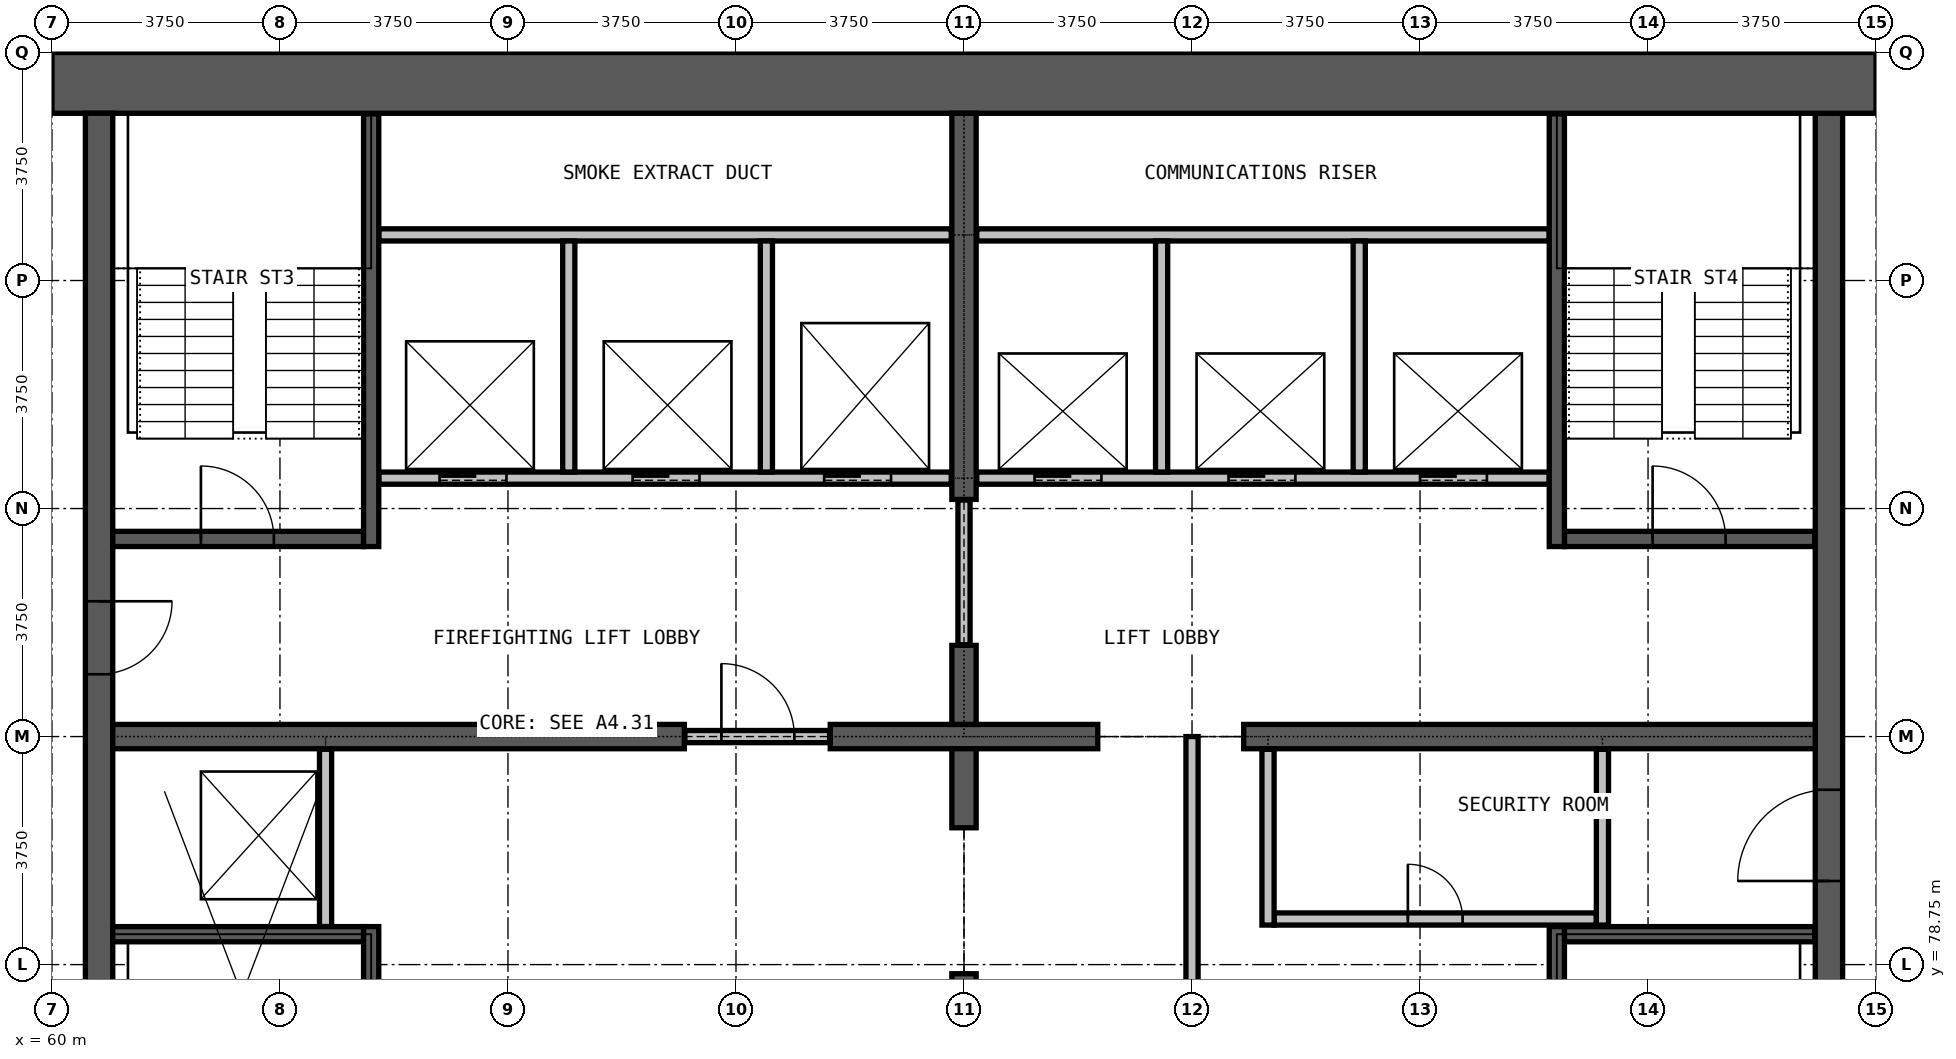
"""IFC4 building model, lengths in metres.
Left out: names, types, materials, properties, quantities, classifications, styles, units other than length and angle.
Written with IfcOpenShell. Run it as: python <this file> out.ifc"""

import sys

from ifc_helpers import new_model, si_unit, direction, frame, frame_2d, origin, place, context, subcontext, project, spatial, rectangle, extrude, element, fill, save


model = new_model("IFC4")
c1 = context("Model", 3, precision=1e-05, world=origin(), true_north=direction((0.0, 1.0)))
c2 = subcontext(c1, "Body", "Model", "MODEL_VIEW")
j1 = project(units=[si_unit("LENGTHUNIT", "METRE"), si_unit("PLANEANGLEUNIT", "RADIAN")], contexts=[c1])
p1 = place(None, origin())
s1 = spatial("IfcSite", under=j1, at=p1, CompositionType="ELEMENT")
p2 = place(p1, origin())
s2 = spatial("IfcBuilding", under=s1, at=p2, CompositionType="ELEMENT")
p3 = place(p2, frame((0.0, 0.0, 280.1)))
s3 = spatial("IfcBuildingStorey", under=s2, at=p3, CompositionType="ELEMENT", Elevation=280.1)
p4 = place(p3, frame((89.225, 72.25, 0.0), z_axis=(0.0, 0.0, 1.0), x_axis=(0.0, 1.0, 0.0)))
e1 = element("IfcWall", 1, at=p4, inside=s3, PredefinedType="SHEAR", context=c2, shape_type="SweptSolid", body=[
    extrude(rectangle(XDim=20.5, YDim=0.45, at=frame_2d((10.25, 0.0))), origin(), (0.0, 0.0, 1.0), 3.6),
])
p5 = place(p4, frame((7.875, 0.0, 0.0)))
e2 = element("IfcOpeningElement", 2, at=p5, cuts=e1, PredefinedType="OPENING", context=c2, shape_type="SweptSolid", body=[
    extrude(rectangle(XDim=1.5, YDim=2.2, at=frame_2d((0.75, 1.1))), frame((0.0, 0.235, 0.0), z_axis=(0.0, -1.0, 0.0), x_axis=(1.0, 0.0, 0.0)), (0.0, 0.0, 1.0), 0.47),
])
p6 = place(p3, frame((90.0, 93.25, 0.0), z_axis=(0.0, 0.0, 1.0), x_axis=(-1.0, 0.0, 0.0)))
e3 = element("IfcWall", 3, at=p6, inside=s3, PredefinedType="SHEAR", context=c2, shape_type="SweptSolid", body=[
    extrude(rectangle(XDim=30.0, YDim=1.0, at=frame_2d((15.0, 0.0))), origin(), (0.0, 0.0, 1.0), 3.6),
])
p7 = place(p3, frame((60.775, 92.75, 0.0), z_axis=(0.0, 0.0, 1.0), x_axis=(0.0, -1.0, 0.0)))
e4 = element("IfcWall", 4, at=p7, inside=s3, PredefinedType="SHEAR", context=c2, shape_type="SweptSolid", body=[
    extrude(rectangle(XDim=20.5, YDim=0.45, at=frame_2d((10.25, 0.0))), origin(), (0.0, 0.0, 1.0), 3.6),
])
p8 = place(p7, frame((8.025, 0.0, 0.0)))
e5 = element("IfcOpeningElement", 5, at=p8, cuts=e4, PredefinedType="OPENING", context=c2, shape_type="SweptSolid", body=[
    extrude(rectangle(XDim=1.2, YDim=2.2, at=frame_2d((0.6, 1.1))), frame((0.0, 0.235, 0.0), z_axis=(0.0, -1.0, 0.0), x_axis=(1.0, 0.0, 0.0)), (0.0, 0.0, 1.0), 0.47),
])
p9 = place(p3, frame((61.0, 82.5, 0.0), z_axis=(0.0, 0.0, 1.0), x_axis=(1.0, 0.0, 0.0)))
e6 = element("IfcWall", 6, at=p9, inside=s3, PredefinedType="SHEAR", context=c2, shape_type="SweptSolid", body=[
    extrude(rectangle(XDim=9.4, YDim=0.4, at=frame_2d((4.7, 0.0))), origin(), (0.0, 0.0, 1.0), 3.6),
])
p10 = place(p3, frame((72.8, 82.5, 0.0), z_axis=(0.0, 0.0, 1.0), x_axis=(1.0, 0.0, 0.0)))
e7 = element("IfcWall", 7, at=p10, inside=s3, PredefinedType="SHEAR", context=c2, shape_type="SweptSolid", body=[
    extrude(rectangle(XDim=4.4, YDim=0.4, at=frame_2d((2.2, 0.0))), origin(), (0.0, 0.0, 1.0), 3.6),
])
p11 = place(p3, frame((79.6, 82.5, 0.0), z_axis=(0.0, 0.0, 1.0), x_axis=(1.0, 0.0, 0.0)))
e8 = element("IfcWall", 8, at=p11, inside=s3, PredefinedType="SHEAR", context=c2, shape_type="SweptSolid", body=[
    extrude(rectangle(XDim=9.4, YDim=0.4, at=frame_2d((4.7, 0.0))), origin(), (0.0, 0.0, 1.0), 3.6),
])
p12 = place(p3, frame((75.0, 72.25, 0.0), z_axis=(0.0, 0.0, 1.0), x_axis=(0.0, 1.0, 0.0)))
e9 = element("IfcWall", 9, at=p12, inside=s3, PredefinedType="SHEAR", context=c2, shape_type="SweptSolid", body=[
    extrude(rectangle(XDim=6.35, YDim=0.4, at=frame_2d((3.175, 0.0))), origin(), (0.0, 0.0, 1.0), 3.6),
])
for number, where, z_axis, x_axis in (
    (10, (75.0, 81.0, 0.0), (0.0, 0.0, 1.0), (0.0, 1.0, 0.0)),
    (11, (75.0, 82.7, 0.0), (0.0, 0.0, 1.0), (0.0, 1.0, 0.0)),
):
    element("IfcWall", number, at=place(p3, frame(where, z_axis=z_axis, x_axis=x_axis)), inside=s3, PredefinedType="SHEAR", context=c2, shape_type="SweptSolid", body=[
        extrude(rectangle(XDim=1.3, YDim=0.4, at=frame_2d((0.65, 0.0))), origin(), (0.0, 0.0, 1.0), 3.6),
    ])
p13 = place(p3, frame((75.0, 86.4, 0.0), z_axis=(0.0, 0.0, 1.0), x_axis=(0.0, 1.0, 0.0)))
e12 = element("IfcWall", 12, at=p13, inside=s3, PredefinedType="SHEAR", context=c2, shape_type="SweptSolid", body=[
    extrude(rectangle(XDim=6.35, YDim=0.4, at=frame_2d((3.175, 0.0))), origin(), (0.0, 0.0, 1.0), 3.6),
])
p14 = place(p3, frame((80.1, 79.5, 0.0), z_axis=(0.0, 0.0, 1.0), x_axis=(1.0, 0.0, 0.0)))
e13 = element("IfcWall", 13, at=p14, inside=s3, PredefinedType="PARTITIONING", context=c2, shape_type="SweptSolid", body=[
    extrude(rectangle(XDim=5.3, YDim=0.2, at=frame_2d((2.65, 0.0))), origin(), (0.0, 0.0, 1.0), 3.3),
])
p15 = place(p14, frame((2.2, 0.0, 0.0)))
e14 = element("IfcOpeningElement", 14, at=p15, cuts=e13, PredefinedType="OPENING", context=c2, shape_type="SweptSolid", body=[
    extrude(rectangle(XDim=0.9, YDim=2.2, at=frame_2d((0.45, 1.1))), frame((0.0, 0.11, 0.0), z_axis=(0.0, -1.0, 0.0), x_axis=(1.0, 0.0, 0.0)), (0.0, 0.0, 1.0), 0.22),
])
p16 = place(p3, frame((70.41, 82.5, 0.0), z_axis=(0.0, 0.0, 1.0), x_axis=(1.0, 0.0, 0.0)))
e15 = element("IfcWall", 15, at=p16, inside=s3, PredefinedType="PARTITIONING", context=c2, shape_type="SweptSolid", body=[
    extrude(rectangle(XDim=2.38, YDim=0.2, at=frame_2d((1.19, 0.0))), origin(), (0.0, 0.0, 1.0), 2.4),
])
p17 = place(p16, frame((0.6, 0.0, 0.0)))
e16 = element("IfcOpeningElement", 16, at=p17, cuts=e15, PredefinedType="OPENING", context=c2, shape_type="SweptSolid", body=[
    extrude(rectangle(XDim=1.2, YDim=2.2, at=frame_2d((0.6, 1.1))), frame((0.0, 0.11, 0.0), z_axis=(0.0, -1.0, 0.0), x_axis=(1.0, 0.0, 0.0)), (0.0, 0.0, 1.0), 0.22),
])
p18 = place(p3, frame((75.0, 84.01, 0.0), z_axis=(0.0, 0.0, 1.0), x_axis=(0.0, 1.0, 0.0)))
e17 = element("IfcWall", 17, at=p18, inside=s3, PredefinedType="PARTITIONING", context=c2, shape_type="SweptSolid", body=[
    extrude(rectangle(XDim=2.38, YDim=0.2, at=frame_2d((1.19, 0.0))), origin(), (0.0, 0.0, 1.0), 2.4),
])
p19 = place(p3, frame((78.75, 72.26, 0.0), z_axis=(0.0, 0.0, 1.0), x_axis=(0.0, 1.0, 0.0)))
e18 = element("IfcWall", 18, at=p19, inside=s3, PredefinedType="PARTITIONING", context=c2, shape_type="SweptSolid", body=[
    extrude(rectangle(XDim=10.24, YDim=0.2, at=frame_2d((5.12, 0.0))), origin(), (0.0, 0.0, 1.0), 3.3),
])
for number, where, z_axis, x_axis in (
    (19, (80.0, 79.4, 0.0), (0.0, 0.0, 1.0), (0.0, 1.0, 0.0)),
    (20, (85.5, 79.4, 0.0), (0.0, 0.0, 1.0), (0.0, 1.0, 0.0)),
):
    element("IfcWall", number, at=place(p3, frame(where, z_axis=z_axis, x_axis=x_axis)), inside=s3, PredefinedType="PARTITIONING", context=c2, shape_type="SweptSolid", body=[
        extrude(rectangle(XDim=2.89, YDim=0.2, at=frame_2d((1.445, 0.0))), origin(), (0.0, 0.0, 1.0), 3.3),
    ])
p20 = place(p3, frame((65.375, 86.75, 0.0), z_axis=(0.0, 0.0, 1.0), x_axis=(1.0, 0.0, 0.0)))
e21 = element("IfcWall", 21, at=p20, inside=s3, PredefinedType="PARTITIONING", context=c2, shape_type="SweptSolid", body=[
    extrude(rectangle(XDim=9.415, YDim=0.2, at=frame_2d((4.708, 0.0))), origin(), (0.0, 0.0, 1.0), 3.3),
])
p21 = place(p20, frame((1.0, 0.0, 0.0)))
e22 = element("IfcOpeningElement", 22, at=p21, cuts=e21, PredefinedType="OPENING", context=c2, shape_type="SweptSolid", body=[
    extrude(rectangle(XDim=1.1, YDim=2.2, at=frame_2d((0.55, 1.1))), frame((0.0, 0.11, 0.0), z_axis=(0.0, -1.0, 0.0), x_axis=(1.0, 0.0, 0.0)), (0.0, 0.0, 1.0), 0.22),
])
p22 = place(p20, frame((4.175, 0.0, 0.0)))
e23 = element("IfcOpeningElement", 23, at=p22, cuts=e21, PredefinedType="OPENING", context=c2, shape_type="SweptSolid", body=[
    extrude(rectangle(XDim=1.1, YDim=2.2, at=frame_2d((0.55, 1.1))), frame((0.0, 0.11, 0.0), z_axis=(0.0, -1.0, 0.0), x_axis=(1.0, 0.0, 0.0)), (0.0, 0.0, 1.0), 0.22),
])
p23 = place(p20, frame((7.325, 0.0, 0.0)))
e24 = element("IfcOpeningElement", 24, at=p23, cuts=e21, PredefinedType="OPENING", context=c2, shape_type="SweptSolid", body=[
    extrude(rectangle(XDim=1.1, YDim=2.2, at=frame_2d((0.55, 1.1))), frame((0.0, 0.11, 0.0), z_axis=(0.0, -1.0, 0.0), x_axis=(1.0, 0.0, 0.0)), (0.0, 0.0, 1.0), 0.22),
])
p24 = place(p3, frame((75.21, 86.75, 0.0), z_axis=(0.0, 0.0, 1.0), x_axis=(1.0, 0.0, 0.0)))
e25 = element("IfcWall", 25, at=p24, inside=s3, PredefinedType="PARTITIONING", context=c2, shape_type="SweptSolid", body=[
    extrude(rectangle(XDim=9.415, YDim=0.2, at=frame_2d((4.708, 0.0))), origin(), (0.0, 0.0, 1.0), 3.3),
])
p25 = place(p24, frame((0.95, 0.0, 0.0)))
e26 = element("IfcOpeningElement", 26, at=p25, cuts=e25, PredefinedType="OPENING", context=c2, shape_type="SweptSolid", body=[
    extrude(rectangle(XDim=1.1, YDim=2.2, at=frame_2d((0.55, 1.1))), frame((0.0, 0.11, 0.0), z_axis=(0.0, -1.0, 0.0), x_axis=(1.0, 0.0, 0.0)), (0.0, 0.0, 1.0), 0.22),
])
p26 = place(p24, frame((4.14, 0.0, 0.0)))
e27 = element("IfcOpeningElement", 27, at=p26, cuts=e25, PredefinedType="OPENING", context=c2, shape_type="SweptSolid", body=[
    extrude(rectangle(XDim=1.1, YDim=2.2, at=frame_2d((0.55, 1.1))), frame((0.0, 0.11, 0.0), z_axis=(0.0, -1.0, 0.0), x_axis=(1.0, 0.0, 0.0)), (0.0, 0.0, 1.0), 0.22),
])
p27 = place(p24, frame((7.29, 0.0, 0.0)))
e28 = element("IfcOpeningElement", 28, at=p27, cuts=e25, PredefinedType="OPENING", context=c2, shape_type="SweptSolid", body=[
    extrude(rectangle(XDim=1.1, YDim=2.2, at=frame_2d((0.55, 1.1))), frame((0.0, 0.11, 0.0), z_axis=(0.0, -1.0, 0.0), x_axis=(1.0, 0.0, 0.0)), (0.0, 0.0, 1.0), 0.22),
])
for number, where, z_axis, x_axis in (
    (29, (65.375, 90.75, 0.0), (0.0, 0.0, 1.0), (1.0, 0.0, 0.0)),
    (30, (75.21, 90.75, 0.0), (0.0, 0.0, 1.0), (1.0, 0.0, 0.0)),
):
    element("IfcWall", number, at=place(p3, frame(where, z_axis=z_axis, x_axis=x_axis)), inside=s3, PredefinedType="PARTITIONING", context=c2, shape_type="SweptSolid", body=[
        extrude(rectangle(XDim=9.415, YDim=0.2, at=frame_2d((4.708, 0.0))), origin(), (0.0, 0.0, 1.0), 3.3),
    ])
p28 = place(p3, frame((64.5, 79.375, 0.0), z_axis=(0.0, 0.0, 1.0), x_axis=(0.0, 1.0, 0.0)))
e31 = element("IfcWall", 31, at=p28, inside=s3, PredefinedType="PARTITIONING", context=c2, shape_type="SweptSolid", body=[
    extrude(rectangle(XDim=2.915, YDim=0.2, at=frame_2d((1.458, 0.0))), origin(), (0.0, 0.0, 1.0), 3.3),
])
for number, where, z_axis, x_axis in (
    (32, (68.5, 86.85, 0.0), (0.0, 0.0, 1.0), (0.0, 1.0, 0.0)),
    (33, (71.75, 86.85, 0.0), (0.0, 0.0, 1.0), (0.0, 1.0, 0.0)),
    (34, (78.25, 86.85, 0.0), (0.0, 0.0, 1.0), (0.0, 1.0, 0.0)),
    (35, (81.5, 86.85, 0.0), (0.0, 0.0, 1.0), (0.0, 1.0, 0.0)),
):
    element("IfcWall", number, at=place(p3, frame(where, z_axis=z_axis, x_axis=x_axis)), inside=s3, PredefinedType="PARTITIONING", context=c2, shape_type="SweptSolid", body=[
        extrude(rectangle(XDim=3.8, YDim=0.2, at=frame_2d((1.9, 0.0))), origin(), (0.0, 0.0, 1.0), 3.3),
    ])
p29 = place(p3, frame((61.0, 79.25, 0.0), z_axis=(0.0, 0.0, 1.0), x_axis=(1.0, 0.0, 0.0)))
e36 = element("IfcWall", 36, at=p29, inside=s3, PredefinedType="PARTITIONING", context=c2, shape_type="SweptSolid", body=[
    extrude(rectangle(XDim=4.125, YDim=0.25, at=frame_2d((2.062, 0.0))), origin(), (0.0, 0.0, 1.0), 3.3),
])
p30 = place(p3, frame((84.875, 79.25, 0.0), z_axis=(0.0, 0.0, 1.0), x_axis=(1.0, 0.0, 0.0)))
e37 = element("IfcWall", 37, at=p30, inside=s3, PredefinedType="PARTITIONING", context=c2, shape_type="SweptSolid", body=[
    extrude(rectangle(XDim=4.115, YDim=0.25, at=frame_2d((2.058, 0.0))), origin(), (0.0, 0.0, 1.0), 3.3),
])
p31 = place(p3, frame((61.0, 85.75, 0.0), z_axis=(0.0, 0.0, 1.0), x_axis=(1.0, 0.0, 0.0)))
e38 = element("IfcWall", 38, at=p31, inside=s3, PredefinedType="PARTITIONING", context=c2, shape_type="SweptSolid", body=[
    extrude(rectangle(XDim=4.125, YDim=0.25, at=frame_2d((2.062, 0.0))), origin(), (0.0, 0.0, 1.0), 3.3),
])
p32 = place(p31, frame((1.45, 0.0, 0.0)))
e39 = element("IfcOpeningElement", 39, at=p32, cuts=e38, PredefinedType="OPENING", context=c2, shape_type="SweptSolid", body=[
    extrude(rectangle(XDim=1.2, YDim=2.2, at=frame_2d((0.6, 1.1))), frame((0.0, 0.135, 0.0), z_axis=(0.0, -1.0, 0.0), x_axis=(1.0, 0.0, 0.0)), (0.0, 0.0, 1.0), 0.27),
])
p33 = place(p3, frame((84.875, 85.75, 0.0), z_axis=(0.0, 0.0, 1.0), x_axis=(1.0, 0.0, 0.0)))
e40 = element("IfcWall", 40, at=p33, inside=s3, PredefinedType="PARTITIONING", context=c2, shape_type="SweptSolid", body=[
    extrude(rectangle(XDim=4.115, YDim=0.25, at=frame_2d((2.058, 0.0))), origin(), (0.0, 0.0, 1.0), 3.3),
])
p34 = place(p33, frame((1.45, 0.0, 0.0)))
e41 = element("IfcOpeningElement", 41, at=p34, cuts=e40, PredefinedType="OPENING", context=c2, shape_type="SweptSolid", body=[
    extrude(rectangle(XDim=1.2, YDim=2.2, at=frame_2d((0.6, 1.1))), frame((0.0, 0.135, 0.0), z_axis=(0.0, -1.0, 0.0), x_axis=(1.0, 0.0, 0.0)), (0.0, 0.0, 1.0), 0.27),
])
p35 = place(p3, frame((65.25, 78.26, 0.0), z_axis=(0.0, 0.0, 1.0), x_axis=(0.0, 1.0, 0.0)))
e42 = element("IfcWall", 42, at=p35, inside=s3, PredefinedType="PARTITIONING", context=c2, shape_type="SweptSolid", body=[
    extrude(rectangle(XDim=1.115, YDim=0.25, at=frame_2d((0.558, 0.0))), origin(), (0.0, 0.0, 1.0), 3.3),
])
p36 = place(p3, frame((65.25, 85.625, 0.0), z_axis=(0.0, 0.0, 1.0), x_axis=(0.0, 1.0, 0.0)))
e43 = element("IfcWall", 43, at=p36, inside=s3, PredefinedType="PARTITIONING", context=c2, shape_type="SweptSolid", body=[
    extrude(rectangle(XDim=7.115, YDim=0.25, at=frame_2d((3.558, 0.0))), origin(), (0.0, 0.0, 1.0), 3.3),
])
p37 = place(p3, frame((84.75, 78.26, 0.0), z_axis=(0.0, 0.0, 1.0), x_axis=(0.0, 1.0, 0.0)))
e44 = element("IfcWall", 44, at=p37, inside=s3, PredefinedType="PARTITIONING", context=c2, shape_type="SweptSolid", body=[
    extrude(rectangle(XDim=1.115, YDim=0.25, at=frame_2d((0.558, 0.0))), origin(), (0.0, 0.0, 1.0), 3.3),
])
p38 = place(p3, frame((84.75, 85.625, 0.0), z_axis=(0.0, 0.0, 1.0), x_axis=(0.0, 1.0, 0.0)))
e45 = element("IfcWall", 45, at=p38, inside=s3, PredefinedType="PARTITIONING", context=c2, shape_type="SweptSolid", body=[
    extrude(rectangle(XDim=7.115, YDim=0.25, at=frame_2d((3.558, 0.0))), origin(), (0.0, 0.0, 1.0), 3.3),
])
p39 = place(p25, origin())
e46 = element("IfcDoor", 46, at=p39, inside=s3, OperationType="DOUBLE_DOOR_SLIDING", PredefinedType="DOOR", context=c2, shape_type="SweptSolid", body=[
    extrude(rectangle(XDim=1.1, YDim=2.2, at=frame_2d((0.55, 1.1))), frame((0.0, 0.025, 0.0), z_axis=(0.0, -1.0, 0.0), x_axis=(1.0, 0.0, 0.0)), (0.0, 0.0, 1.0), 0.05),
])
fill(e26, e46)
p40 = place(p26, origin())
e47 = element("IfcDoor", 47, at=p40, inside=s3, OperationType="DOUBLE_DOOR_SLIDING", PredefinedType="DOOR", context=c2, shape_type="SweptSolid", body=[
    extrude(rectangle(XDim=1.1, YDim=2.2, at=frame_2d((0.55, 1.1))), frame((0.0, 0.025, 0.0), z_axis=(0.0, -1.0, 0.0), x_axis=(1.0, 0.0, 0.0)), (0.0, 0.0, 1.0), 0.05),
])
fill(e27, e47)
p41 = place(p27, origin())
e48 = element("IfcDoor", 48, at=p41, inside=s3, OperationType="DOUBLE_DOOR_SLIDING", PredefinedType="DOOR", context=c2, shape_type="SweptSolid", body=[
    extrude(rectangle(XDim=1.1, YDim=2.2, at=frame_2d((0.55, 1.1))), frame((0.0, 0.025, 0.0), z_axis=(0.0, -1.0, 0.0), x_axis=(1.0, 0.0, 0.0)), (0.0, 0.0, 1.0), 0.05),
])
fill(e28, e48)
p42 = place(p21, origin())
e49 = element("IfcDoor", 49, at=p42, inside=s3, OperationType="DOUBLE_DOOR_SLIDING", PredefinedType="DOOR", context=c2, shape_type="SweptSolid", body=[
    extrude(rectangle(XDim=1.1, YDim=2.2, at=frame_2d((0.55, 1.1))), frame((0.0, 0.025, 0.0), z_axis=(0.0, -1.0, 0.0), x_axis=(1.0, 0.0, 0.0)), (0.0, 0.0, 1.0), 0.05),
])
fill(e22, e49)
p43 = place(p22, origin())
e50 = element("IfcDoor", 50, at=p43, inside=s3, OperationType="DOUBLE_DOOR_SLIDING", PredefinedType="DOOR", context=c2, shape_type="SweptSolid", body=[
    extrude(rectangle(XDim=1.1, YDim=2.2, at=frame_2d((0.55, 1.1))), frame((0.0, 0.025, 0.0), z_axis=(0.0, -1.0, 0.0), x_axis=(1.0, 0.0, 0.0)), (0.0, 0.0, 1.0), 0.05),
])
fill(e23, e50)
p44 = place(p23, origin())
e51 = element("IfcDoor", 51, at=p44, inside=s3, OperationType="DOUBLE_DOOR_SLIDING", PredefinedType="DOOR", context=c2, shape_type="SweptSolid", body=[
    extrude(rectangle(XDim=1.1, YDim=2.2, at=frame_2d((0.55, 1.1))), frame((0.0, 0.025, 0.0), z_axis=(0.0, -1.0, 0.0), x_axis=(1.0, 0.0, 0.0)), (0.0, 0.0, 1.0), 0.05),
])
fill(e24, e51)
p45 = place(p17, origin())
e52 = element("IfcDoor", 52, at=p45, inside=s3, OperationType="SINGLE_SWING_LEFT", PredefinedType="DOOR", context=c2, shape_type="SweptSolid", body=[
    extrude(rectangle(XDim=1.2, YDim=2.2, at=frame_2d((0.6, 1.1))), frame((0.0, 0.025, 0.0), z_axis=(0.0, -1.0, 0.0), x_axis=(1.0, 0.0, 0.0)), (0.0, 0.0, 1.0), 0.05),
])
fill(e16, e52)
p46 = place(p32, origin())
e53 = element("IfcDoor", 53, at=p46, inside=s3, OperationType="SINGLE_SWING_RIGHT", PredefinedType="DOOR", context=c2, shape_type="SweptSolid", body=[
    extrude(rectangle(XDim=1.2, YDim=2.2, at=frame_2d((0.6, 1.1))), frame((0.0, 0.025, 0.0), z_axis=(0.0, -1.0, 0.0), x_axis=(1.0, 0.0, 0.0)), (0.0, 0.0, 1.0), 0.05),
])
fill(e39, e53)
p47 = place(p34, origin())
e54 = element("IfcDoor", 54, at=p47, inside=s3, OperationType="SINGLE_SWING_RIGHT", PredefinedType="DOOR", context=c2, shape_type="SweptSolid", body=[
    extrude(rectangle(XDim=1.2, YDim=2.2, at=frame_2d((0.6, 1.1))), frame((0.0, 0.025, 0.0), z_axis=(0.0, -1.0, 0.0), x_axis=(1.0, 0.0, 0.0)), (0.0, 0.0, 1.0), 0.05),
])
fill(e41, e54)
p48 = place(p5, origin())
e55 = element("IfcDoor", 55, at=p48, inside=s3, OperationType="DOUBLE_DOOR_SINGLE_SWING", PredefinedType="DOOR", context=c2, shape_type="SweptSolid", body=[
    extrude(rectangle(XDim=1.5, YDim=2.2, at=frame_2d((0.75, 1.1))), frame((0.0, 0.025, 0.0), z_axis=(0.0, -1.0, 0.0), x_axis=(1.0, 0.0, 0.0)), (0.0, 0.0, 1.0), 0.05),
])
fill(e2, e55)
p49 = place(p15, origin())
e56 = element("IfcDoor", 56, at=p49, inside=s3, OperationType="SINGLE_SWING_LEFT", PredefinedType="DOOR", context=c2, shape_type="SweptSolid", body=[
    extrude(rectangle(XDim=0.9, YDim=2.2, at=frame_2d((0.45, 1.1))), frame((0.0, 0.025, 0.0), z_axis=(0.0, -1.0, 0.0), x_axis=(1.0, 0.0, 0.0)), (0.0, 0.0, 1.0), 0.05),
])
fill(e14, e56)
p50 = place(p8, origin())
e57 = element("IfcDoor", 57, at=p50, inside=s3, OperationType="SINGLE_SWING_RIGHT", PredefinedType="DOOR", context=c2, shape_type="SweptSolid", body=[
    extrude(rectangle(XDim=1.2, YDim=2.2, at=frame_2d((0.6, 1.1))), frame((0.0, 0.025, 0.0), z_axis=(0.0, -1.0, 0.0), x_axis=(1.0, 0.0, 0.0)), (0.0, 0.0, 1.0), 0.05),
])
fill(e5, e57)
save(model, sys.argv[1])
